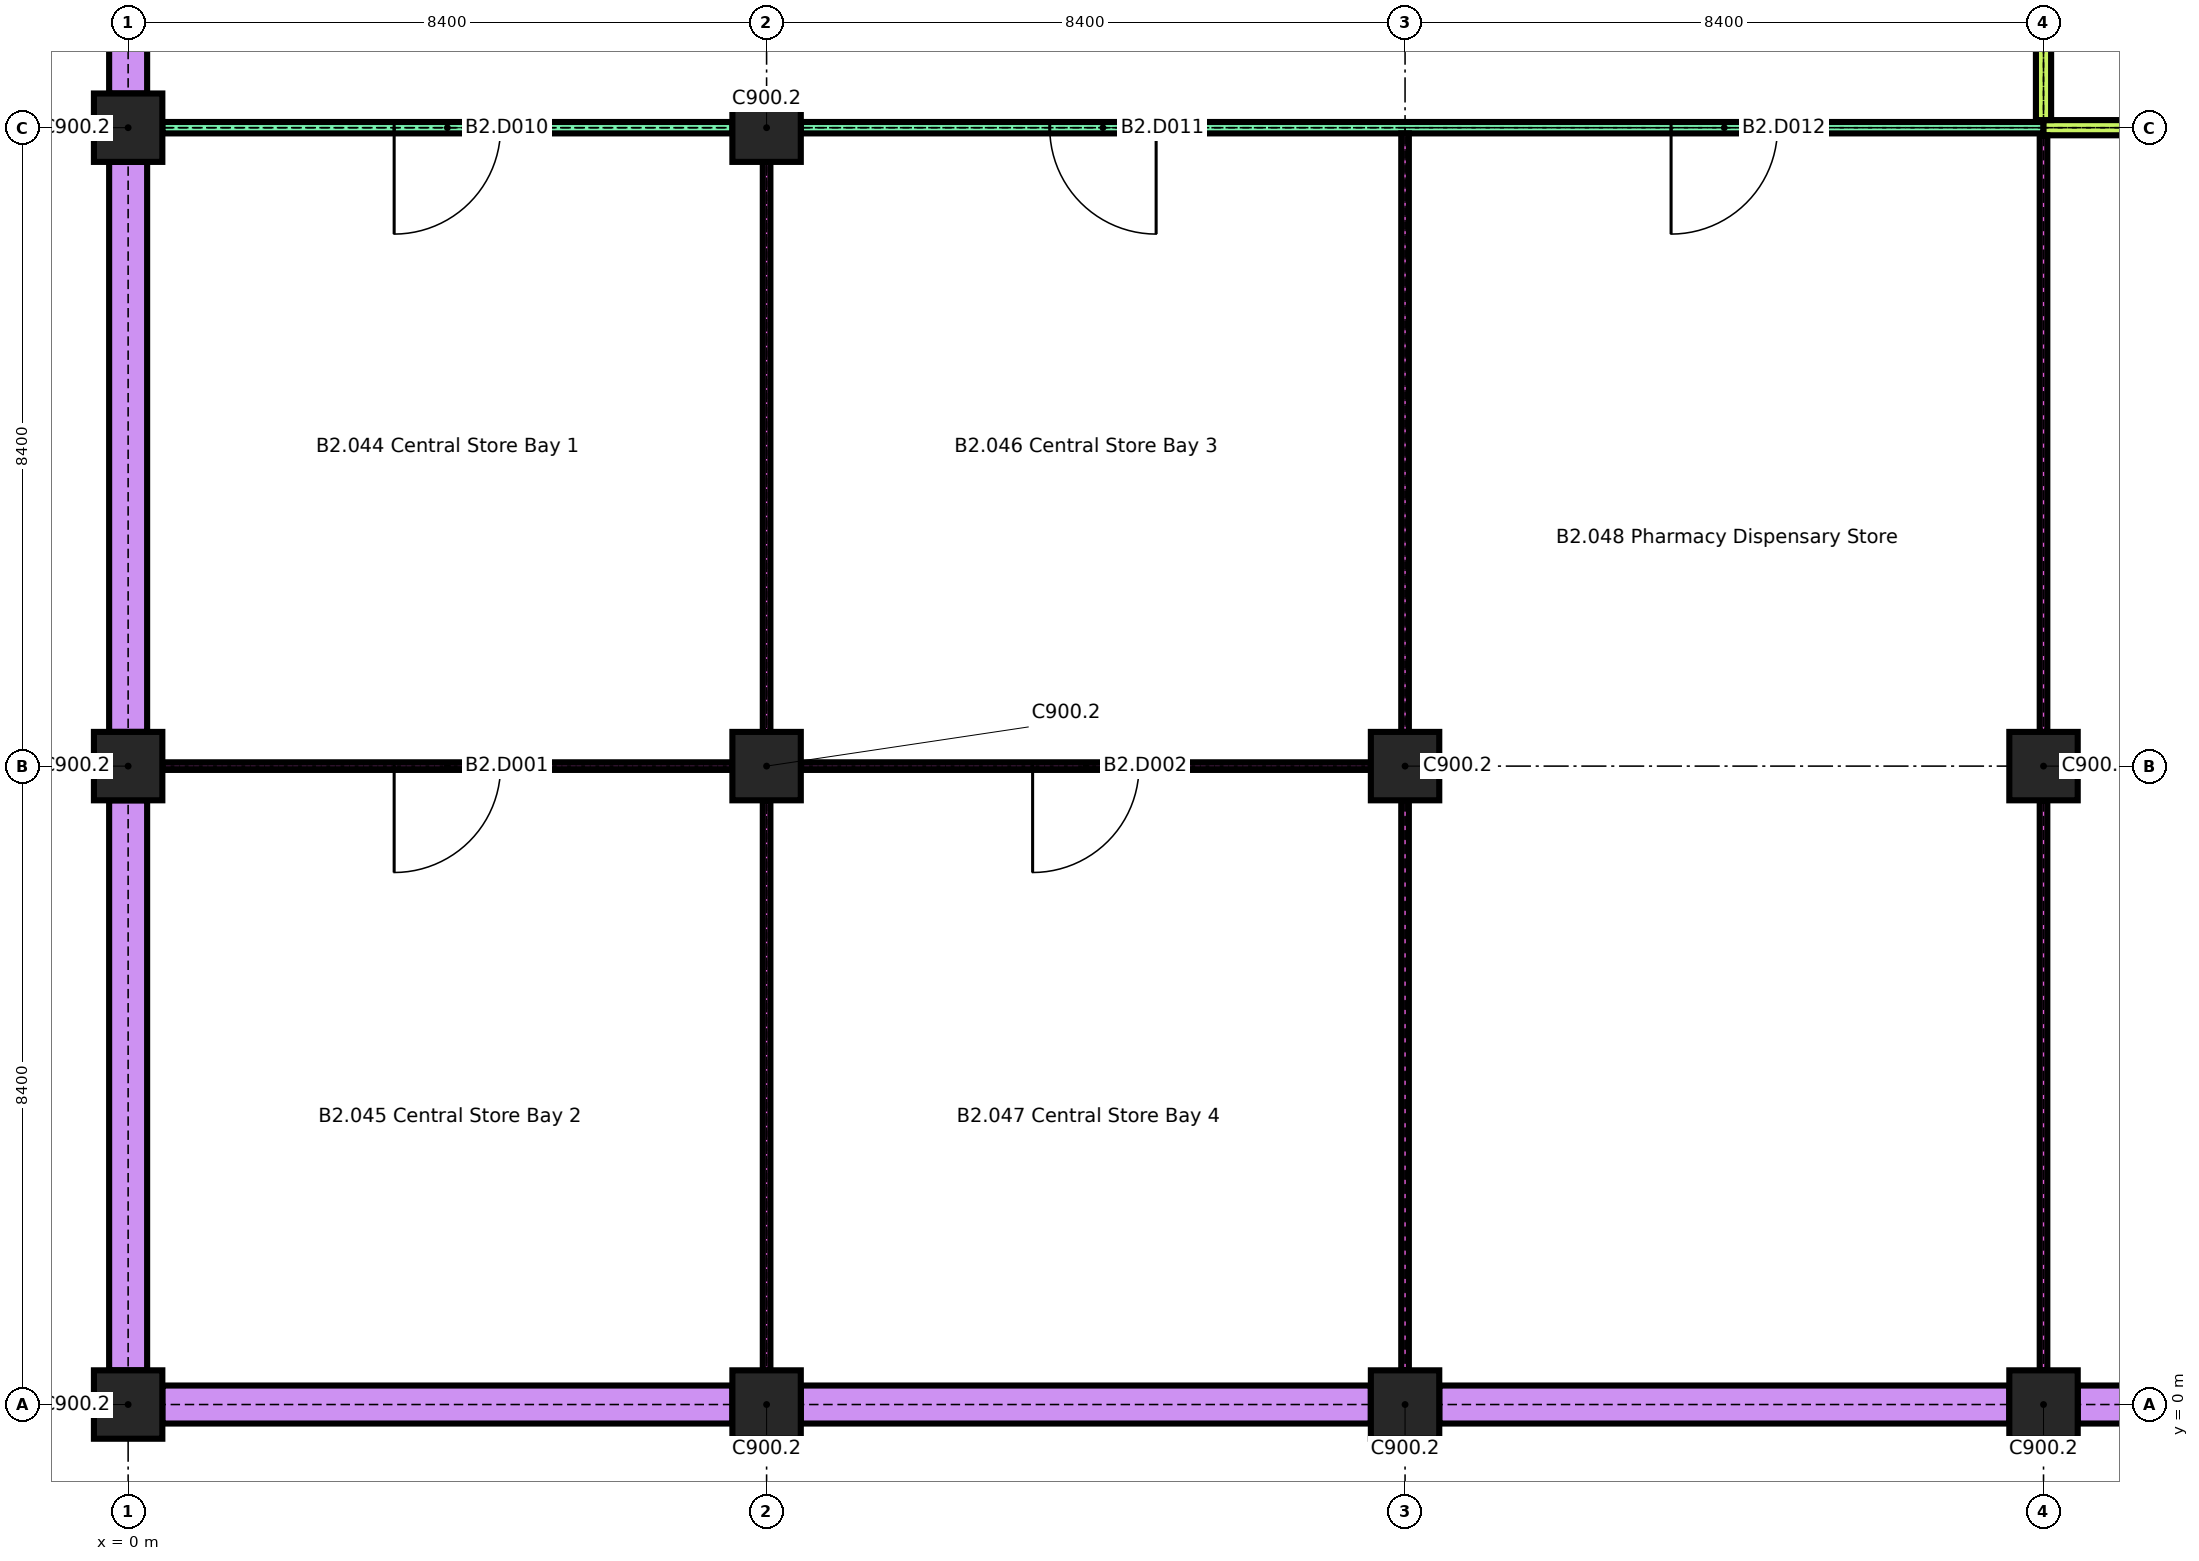
"""IFC4 building model, lengths in metres.
Left out: names, types, materials, properties, quantities, classifications, styles, units other than length and angle.
Written with IfcOpenShell. Run it as: python <this file> out.ifc"""

import sys

from ifc_helpers import new_model, si_unit, direction, frame, frame_2d, origin, origin_2d, place, context, subcontext, project, spatial, rectangle, extrude, element, fill, save


model = new_model("IFC4")
c1 = context("Model", 3, precision=1e-05, world=origin(), true_north=direction((0.0, 1.0)))
c2 = subcontext(c1, "Body", "Model", "MODEL_VIEW")
j1 = project(units=[si_unit("LENGTHUNIT", "METRE"), si_unit("PLANEANGLEUNIT", "RADIAN")], contexts=[c1])
p1 = place(None, origin())
s1 = spatial("IfcSite", under=j1, at=p1, CompositionType="ELEMENT")
p2 = place(p1, origin())
s2 = spatial("IfcBuilding", under=s1, at=p2, CompositionType="ELEMENT")
p3 = place(p2, frame((0.0, 0.0, -7.8)))
s3 = spatial("IfcBuildingStorey", under=s2, at=p3, CompositionType="ELEMENT", Elevation=-7.8)
for number, where, z_axis, x_axis in (
    (1, (0.0, 0.0, 0.0), (0.0, 0.0, 1.0), (1.0, 0.0, 0.0)),
    (2, (8.4, 0.0, 0.0), (0.0, 0.0, 1.0), (1.0, 0.0, 0.0)),
    (3, (16.8, 0.0, 0.0), (0.0, 0.0, 1.0), (1.0, 0.0, 0.0)),
    (4, (25.2, 0.0, 0.0), (0.0, 0.0, 1.0), (1.0, 0.0, 0.0)),
    (5, (0.0, 8.4, 0.0), (0.0, 0.0, 1.0), (1.0, 0.0, 0.0)),
    (6, (8.4, 8.4, 0.0), (0.0, 0.0, 1.0), (1.0, 0.0, 0.0)),
    (7, (16.8, 8.4, 0.0), (0.0, 0.0, 1.0), (1.0, 0.0, 0.0)),
    (8, (25.2, 8.4, 0.0), (0.0, 0.0, 1.0), (1.0, 0.0, 0.0)),
    (9, (0.0, 16.8, 0.0), (0.0, 0.0, 1.0), (1.0, 0.0, 0.0)),
    (10, (8.4, 16.8, 0.0), (0.0, 0.0, 1.0), (1.0, 0.0, 0.0)),
):
    element("IfcColumn", number, at=place(p3, frame(where, z_axis=z_axis, x_axis=x_axis)), inside=s3, PredefinedType="COLUMN", context=c2, shape_type="SweptSolid", body=[
        extrude(rectangle(XDim=0.9, YDim=0.9, at=origin_2d()), origin(), (0.0, 0.0, 1.0), 3.1),
    ])
for number, where, z_axis, x_axis in (
    (11, (0.45, 0.0, 0.0), (0.0, 0.0, 1.0), (1.0, 0.0, 0.0)),
    (12, (8.85, 0.0, 0.0), (0.0, 0.0, 1.0), (1.0, 0.0, 0.0)),
    (13, (17.25, 0.0, 0.0), (0.0, 0.0, 1.0), (1.0, 0.0, 0.0)),
    (14, (25.65, 0.0, 0.0), (0.0, 0.0, 1.0), (1.0, 0.0, 0.0)),
    (15, (0.0, 0.45, 0.0), (0.0, 0.0, 1.0), (0.0, 1.0, 0.0)),
    (16, (0.0, 8.85, 0.0), (0.0, 0.0, 1.0), (0.0, 1.0, 0.0)),
):
    element("IfcWall", number, at=place(p3, frame(where, z_axis=z_axis, x_axis=x_axis)), inside=s3, PredefinedType="SOLIDWALL", context=c2, shape_type="SweptSolid", body=[
        extrude(rectangle(XDim=7.5, YDim=0.5, at=frame_2d((3.75, 0.0))), origin(), (0.0, 0.0, 1.0), 3.1),
    ])
p4 = place(p3, frame((0.0, 17.25, 0.0), z_axis=(0.0, 0.0, 1.0), x_axis=(0.0, 1.0, 0.0)))
e17 = element("IfcWall", 17, at=p4, inside=s3, PredefinedType="SOLIDWALL", context=c2, shape_type="SweptSolid", body=[
    extrude(rectangle(XDim=16.6, YDim=0.5, at=frame_2d((8.3, 0.0))), origin(), (0.0, 0.0, 1.0), 3.1),
])
p5 = place(p3, frame((0.45, 8.4, 0.0), z_axis=(0.0, 0.0, 1.0), x_axis=(1.0, 0.0, 0.0)))
e18 = element("IfcWall", 18, at=p5, inside=s3, PredefinedType="PARTITIONING", context=c2, shape_type="SweptSolid", body=[
    extrude(rectangle(XDim=7.5, YDim=0.1, at=frame_2d((3.75, 0.0))), origin(), (0.0, 0.0, 1.0), 3.1),
])
p6 = place(p5, frame((3.05, 0.0, 0.0)))
e19 = element("IfcOpeningElement", 19, at=p6, cuts=e18, PredefinedType="OPENING", context=c2, shape_type="SweptSolid", body=[
    extrude(rectangle(XDim=1.4, YDim=2.1, at=frame_2d((0.7, 1.05))), frame((0.0, 0.06, 0.0), z_axis=(0.0, -1.0, 0.0), x_axis=(1.0, 0.0, 0.0)), (0.0, 0.0, 1.0), 0.12),
])
p7 = place(p3, frame((8.85, 8.4, 0.0), z_axis=(0.0, 0.0, 1.0), x_axis=(1.0, 0.0, 0.0)))
e20 = element("IfcWall", 20, at=p7, inside=s3, PredefinedType="PARTITIONING", context=c2, shape_type="SweptSolid", body=[
    extrude(rectangle(XDim=7.5, YDim=0.1, at=frame_2d((3.75, 0.0))), origin(), (0.0, 0.0, 1.0), 3.1),
])
p8 = place(p7, frame((3.05, 0.0, 0.0)))
e21 = element("IfcOpeningElement", 21, at=p8, cuts=e20, PredefinedType="OPENING", context=c2, shape_type="SweptSolid", body=[
    extrude(rectangle(XDim=1.4, YDim=2.1, at=frame_2d((0.7, 1.05))), frame((0.0, 0.06, 0.0), z_axis=(0.0, -1.0, 0.0), x_axis=(1.0, 0.0, 0.0)), (0.0, 0.0, 1.0), 0.12),
])
p9 = place(p3, frame((0.45, 16.8, 0.0), z_axis=(0.0, 0.0, 1.0), x_axis=(1.0, 0.0, 0.0)))
e22 = element("IfcWall", 22, at=p9, inside=s3, PredefinedType="PARTITIONING", context=c2, shape_type="SweptSolid", body=[
    extrude(rectangle(XDim=7.5, YDim=0.15, at=frame_2d((3.75, 0.0))), origin(), (0.0, 0.0, 1.0), 3.1),
])
p10 = place(p9, frame((3.05, 0.0, 0.0)))
e23 = element("IfcOpeningElement", 23, at=p10, cuts=e22, PredefinedType="OPENING", context=c2, shape_type="SweptSolid", body=[
    extrude(rectangle(XDim=1.4, YDim=2.1, at=frame_2d((0.7, 1.05))), frame((0.0, 0.085, 0.0), z_axis=(0.0, -1.0, 0.0), x_axis=(1.0, 0.0, 0.0)), (0.0, 0.0, 1.0), 0.17),
])
p11 = place(p3, frame((8.85, 16.8, 0.0), z_axis=(0.0, 0.0, 1.0), x_axis=(1.0, 0.0, 0.0)))
e24 = element("IfcWall", 24, at=p11, inside=s3, PredefinedType="PARTITIONING", context=c2, shape_type="SweptSolid", body=[
    extrude(rectangle(XDim=16.35, YDim=0.15, at=frame_2d((8.175, 0.0))), origin(), (0.0, 0.0, 1.0), 3.1),
])
p12 = place(p11, frame((3.275, 0.0, 0.0)))
e25 = element("IfcOpeningElement", 25, at=p12, cuts=e24, PredefinedType="OPENING", context=c2, shape_type="SweptSolid", body=[
    extrude(rectangle(XDim=1.4, YDim=2.1, at=frame_2d((0.7, 1.05))), frame((0.0, 0.085, 0.0), z_axis=(0.0, -1.0, 0.0), x_axis=(1.0, 0.0, 0.0)), (0.0, 0.0, 1.0), 0.17),
])
p13 = place(p11, frame((11.45, 0.0, 0.0)))
e26 = element("IfcOpeningElement", 26, at=p13, cuts=e24, PredefinedType="OPENING", context=c2, shape_type="SweptSolid", body=[
    extrude(rectangle(XDim=1.4, YDim=2.1, at=frame_2d((0.7, 1.05))), frame((0.0, 0.085, 0.0), z_axis=(0.0, -1.0, 0.0), x_axis=(1.0, 0.0, 0.0)), (0.0, 0.0, 1.0), 0.17),
])
p14 = place(p3, frame((25.2, 16.8, 0.0), z_axis=(0.0, 0.0, 1.0), x_axis=(1.0, 0.0, 0.0)))
e27 = element("IfcWall", 27, at=p14, inside=s3, PredefinedType="PARTITIONING", context=c2, shape_type="SweptSolid", body=[
    extrude(rectangle(XDim=4.2, YDim=0.2, at=frame_2d((2.1, 0.0))), origin(), (0.0, 0.0, 1.0), 3.1),
])
for number, where, z_axis, x_axis in (
    (28, (8.4, 0.45, 0.0), (0.0, 0.0, 1.0), (0.0, 1.0, 0.0)),
    (29, (8.4, 8.85, 0.0), (0.0, 0.0, 1.0), (0.0, 1.0, 0.0)),
    (30, (16.8, 0.45, 0.0), (0.0, 0.0, 1.0), (0.0, 1.0, 0.0)),
):
    element("IfcWall", number, at=place(p3, frame(where, z_axis=z_axis, x_axis=x_axis)), inside=s3, PredefinedType="PARTITIONING", context=c2, shape_type="SweptSolid", body=[
        extrude(rectangle(XDim=7.5, YDim=0.1, at=frame_2d((3.75, 0.0))), origin(), (0.0, 0.0, 1.0), 3.1),
    ])
p15 = place(p3, frame((16.8, 8.85, 0.0), z_axis=(0.0, 0.0, 1.0), x_axis=(0.0, 1.0, 0.0)))
e31 = element("IfcWall", 31, at=p15, inside=s3, PredefinedType="PARTITIONING", context=c2, shape_type="SweptSolid", body=[
    extrude(rectangle(XDim=7.875, YDim=0.1, at=frame_2d((3.938, 0.0))), origin(), (0.0, 0.0, 1.0), 3.1),
])
p16 = place(p3, frame((25.2, 0.45, 0.0), z_axis=(0.0, 0.0, 1.0), x_axis=(0.0, 1.0, 0.0)))
e32 = element("IfcWall", 32, at=p16, inside=s3, PredefinedType="PARTITIONING", context=c2, shape_type="SweptSolid", body=[
    extrude(rectangle(XDim=7.5, YDim=0.1, at=frame_2d((3.75, 0.0))), origin(), (0.0, 0.0, 1.0), 3.1),
])
p17 = place(p3, frame((25.2, 8.85, 0.0), z_axis=(0.0, 0.0, 1.0), x_axis=(0.0, 1.0, 0.0)))
e33 = element("IfcWall", 33, at=p17, inside=s3, PredefinedType="PARTITIONING", context=c2, shape_type="SweptSolid", body=[
    extrude(rectangle(XDim=7.85, YDim=0.1, at=frame_2d((3.925, 0.0))), origin(), (0.0, 0.0, 1.0), 3.1),
])
p18 = place(p3, frame((25.2, 16.9, 0.0), z_axis=(0.0, 0.0, 1.0), x_axis=(0.0, 1.0, 0.0)))
e34 = element("IfcWall", 34, at=p18, inside=s3, PredefinedType="PARTITIONING", context=c2, shape_type="SweptSolid", body=[
    extrude(rectangle(XDim=4.5, YDim=0.2, at=frame_2d((2.25, 0.0))), origin(), (0.0, 0.0, 1.0), 3.1),
])
p19 = place(p18, frame((1.25, 0.0, 0.0)))
e35 = element("IfcOpeningElement", 35, at=p19, cuts=e34, PredefinedType="OPENING", context=c2, shape_type="SweptSolid", body=[
    extrude(rectangle(XDim=2.0, YDim=2.4, at=frame_2d((1.0, 1.2))), frame((0.0, 0.11, 0.0), z_axis=(0.0, -1.0, 0.0), x_axis=(1.0, 0.0, 0.0)), (0.0, 0.0, 1.0), 0.22),
])
p20 = place(p6, origin())
e36 = element("IfcDoor", 36, at=p20, inside=s3, OperationType="SINGLE_SWING_LEFT", PredefinedType="DOOR", context=c2, shape_type="SweptSolid", body=[
    extrude(rectangle(XDim=1.4, YDim=2.1, at=frame_2d((0.7, 1.05))), frame((0.0, 0.025, 0.0), z_axis=(0.0, -1.0, 0.0), x_axis=(1.0, 0.0, 0.0)), (0.0, 0.0, 1.0), 0.05),
])
fill(e19, e36)
p21 = place(p8, origin())
e37 = element("IfcDoor", 37, at=p21, inside=s3, OperationType="SINGLE_SWING_LEFT", PredefinedType="DOOR", context=c2, shape_type="SweptSolid", body=[
    extrude(rectangle(XDim=1.4, YDim=2.1, at=frame_2d((0.7, 1.05))), frame((0.0, 0.025, 0.0), z_axis=(0.0, -1.0, 0.0), x_axis=(1.0, 0.0, 0.0)), (0.0, 0.0, 1.0), 0.05),
])
fill(e21, e37)
p22 = place(p10, origin())
e38 = element("IfcDoor", 38, at=p22, inside=s3, OperationType="SINGLE_SWING_LEFT", PredefinedType="DOOR", context=c2, shape_type="SweptSolid", body=[
    extrude(rectangle(XDim=1.4, YDim=2.1, at=frame_2d((0.7, 1.05))), frame((0.0, 0.025, 0.0), z_axis=(0.0, -1.0, 0.0), x_axis=(1.0, 0.0, 0.0)), (0.0, 0.0, 1.0), 0.05),
])
fill(e23, e38)
p23 = place(p12, origin())
e39 = element("IfcDoor", 39, at=p23, inside=s3, OperationType="SINGLE_SWING_RIGHT", PredefinedType="DOOR", context=c2, shape_type="SweptSolid", body=[
    extrude(rectangle(XDim=1.4, YDim=2.1, at=frame_2d((0.7, 1.05))), frame((0.0, 0.025, 0.0), z_axis=(0.0, -1.0, 0.0), x_axis=(1.0, 0.0, 0.0)), (0.0, 0.0, 1.0), 0.05),
])
fill(e25, e39)
p24 = place(p13, origin())
e40 = element("IfcDoor", 40, at=p24, inside=s3, OperationType="SINGLE_SWING_LEFT", PredefinedType="DOOR", context=c2, shape_type="SweptSolid", body=[
    extrude(rectangle(XDim=1.4, YDim=2.1, at=frame_2d((0.7, 1.05))), frame((0.0, 0.025, 0.0), z_axis=(0.0, -1.0, 0.0), x_axis=(1.0, 0.0, 0.0)), (0.0, 0.0, 1.0), 0.05),
])
fill(e26, e40)
save(model, sys.argv[1])
